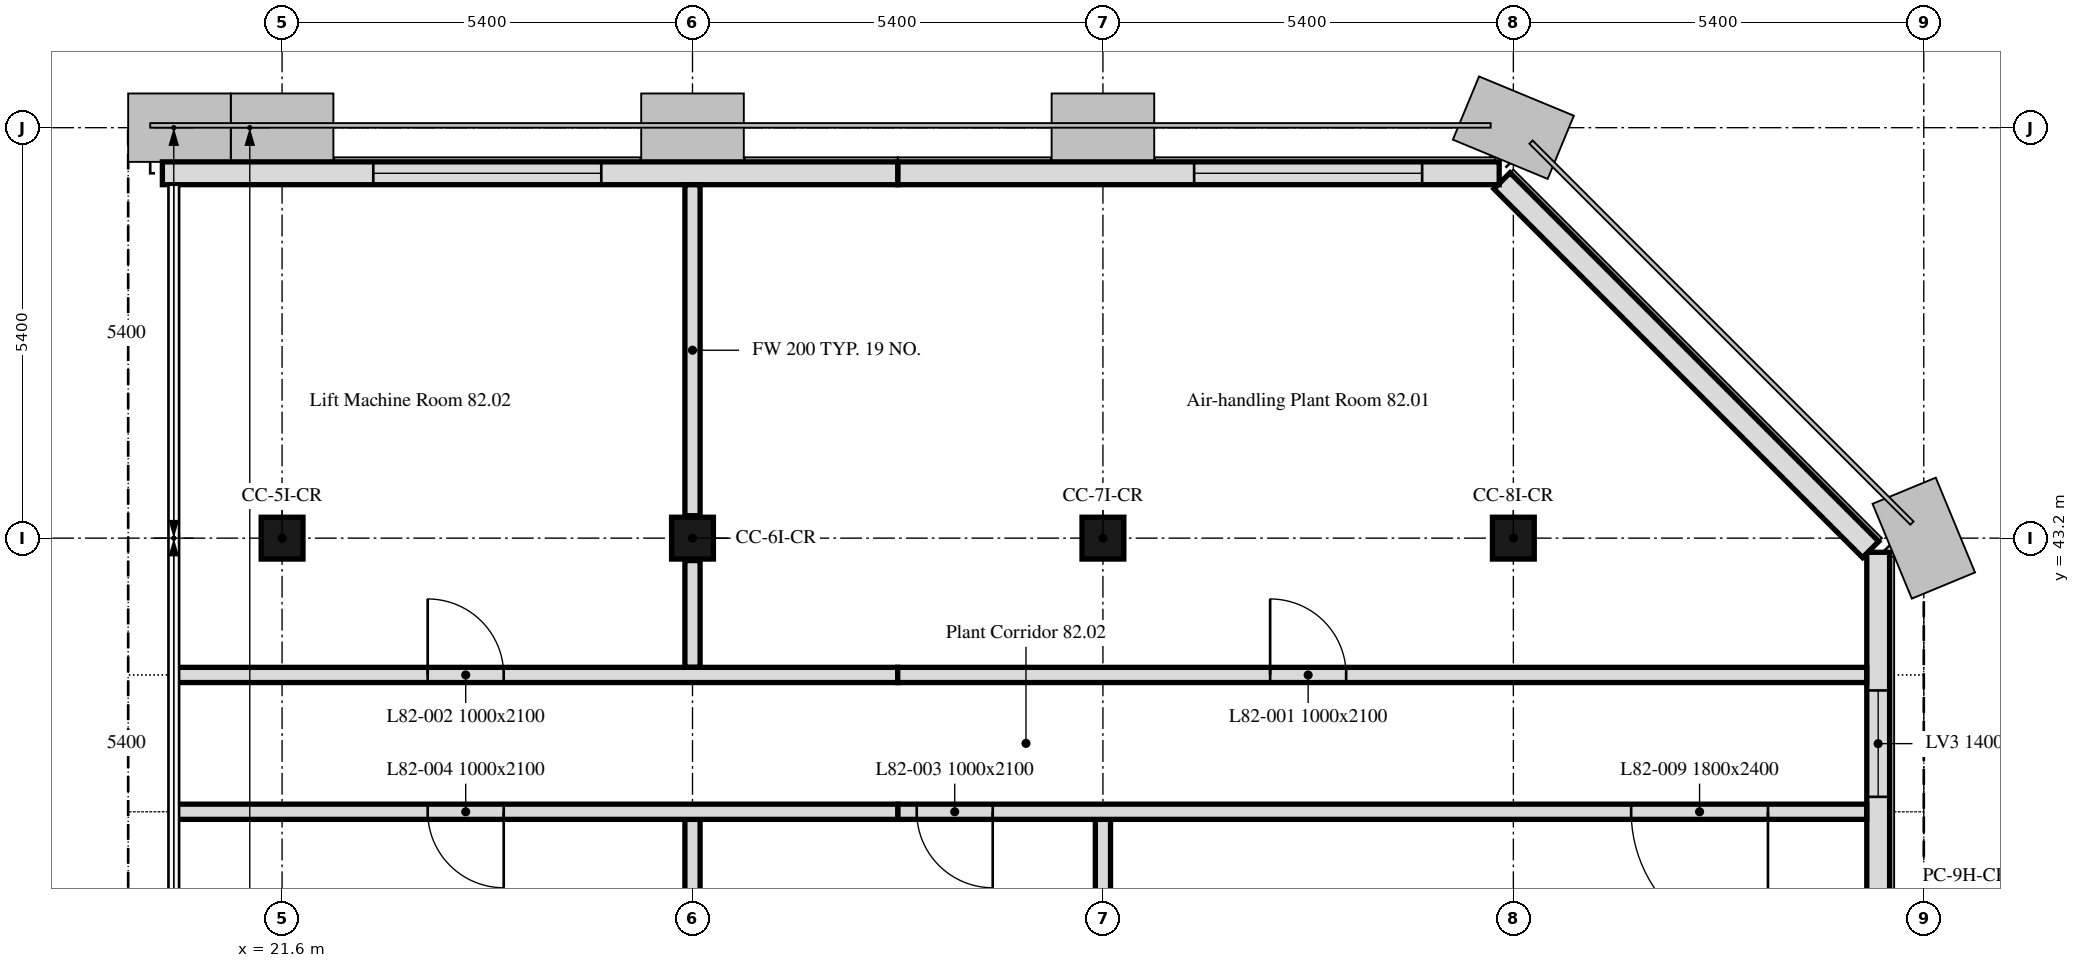
"""IFC4 building model, lengths in metres.
Left out: names, types, materials, properties, quantities, classifications, styles, units other than length and angle.
Written with IfcOpenShell. Run it as: python <this file> out.ifc"""

import sys

from ifc_helpers import new_model, si_unit, direction, frame, frame_2d, origin, origin_2d, place, context, subcontext, project, spatial, polyline, rectangle, outline, extrude, element, fill, save


model = new_model("IFC4")
c1 = context("Model", 3, precision=1e-05, world=origin(), true_north=direction((0.0, 1.0)))
c2 = subcontext(c1, "Body", "Model", "MODEL_VIEW")
j1 = project(units=[si_unit("LENGTHUNIT", "METRE"), si_unit("PLANEANGLEUNIT", "RADIAN")], contexts=[c1])
p1 = place(None, origin())
s1 = spatial("IfcSite", under=j1, at=p1, CompositionType="ELEMENT")
p2 = place(p1, origin())
s2 = spatial("IfcBuilding", under=s1, at=p2, CompositionType="ELEMENT")
p3 = place(p2, frame((0.0, 0.0, 330.7)))
s3 = spatial("IfcBuildingStorey", under=s2, at=p3, CompositionType="ELEMENT", Elevation=330.7)
p4 = place(p3, frame((21.6, 43.2, 0.0), z_axis=(0.0, 0.0, 1.0), x_axis=(1.0, 0.0, 0.0)))
e1 = element("IfcColumn", 1, at=p4, inside=s3, PredefinedType="COLUMN", context=c2, shape_type="SweptSolid", body=[
    extrude(rectangle(XDim=0.55, YDim=0.55, at=origin_2d()), origin(), (0.0, 0.0, 1.0), 3.6),
])
for number, where, z_axis, x_axis in (
    (2, (27.0, 43.2, 0.0), (0.0, 0.0, 1.0), (1.0, 0.0, 0.0)),
    (3, (32.4, 43.2, 0.0), (0.0, 0.0, 1.0), (1.0, 0.0, 0.0)),
    (4, (37.8, 43.2, 0.0), (0.0, 0.0, 1.0), (1.0, 0.0, 0.0)),
):
    element("IfcColumn", number, at=place(p3, frame(where, z_axis=z_axis, x_axis=x_axis)), inside=s3, PredefinedType="COLUMN", context=c2, shape_type="SweptSolid", body=[
        extrude(rectangle(XDim=0.55, YDim=0.55, at=origin_2d()), origin(), (0.0, 0.0, 1.0), 4.2),
    ])
p5 = place(p3, frame((42.6, 32.4, 0.0), z_axis=(0.0, 0.0, 1.0), x_axis=(0.0, 1.0, 0.0)))
e5 = element("IfcWall", 5, at=p5, inside=s3, PredefinedType="SOLIDWALL", context=c2, shape_type="SweptSolid", body=[
    extrude(outline(polyline([(0.0, 0.0), (10.614, 0.0), (10.614, 4.2), (10.024, 4.2), (9.434, 4.2), (8.845, 4.2), (8.255, 4.2), (7.665, 4.2), (7.076, 4.2), (6.486, 4.2), (5.896, 4.2), (5.307, 4.2), (4.717, 4.2), (4.127, 4.2), (3.538, 4.2), (2.948, 4.2), (2.359, 4.2), (1.769, 4.2), (1.179, 4.2), (0.59, 4.2), (0.0, 4.2), (0.0, 0.0)])), frame((0.0, 0.15, 0.0), z_axis=(0.0, -1.0, 0.0), x_axis=(1.0, 0.0, 0.0)), (0.0, 0.0, 1.0), 0.3),
])
p6 = place(p5, frame((1.2, 0.0, 0.6)))
e6 = element("IfcOpeningElement", 6, at=p6, cuts=e5, PredefinedType="OPENING", context=c2, shape_type="SweptSolid", body=[
    extrude(rectangle(XDim=3.0, YDim=1.8, at=frame_2d((1.5, 0.9))), frame((0.0, 0.16, 0.0), z_axis=(0.0, -1.0, 0.0), x_axis=(1.0, 0.0, 0.0)), (0.0, 0.0, 1.0), 0.32),
])
p7 = place(p5, frame((7.396, 0.0, 0.6)))
e7 = element("IfcOpeningElement", 7, at=p7, cuts=e5, PredefinedType="OPENING", context=c2, shape_type="SweptSolid", body=[
    extrude(rectangle(XDim=1.4, YDim=1.8, at=frame_2d((0.7, 0.9))), frame((0.0, 0.16, 0.0), z_axis=(0.0, -1.0, 0.0), x_axis=(1.0, 0.0, 0.0)), (0.0, 0.0, 1.0), 0.32),
])
p8 = place(p3, frame((42.501, 43.051, 0.0), z_axis=(0.0, 0.0, 1.0), x_axis=(-0.707106781187, 0.707106781187, 0.0)))
e8 = element("IfcWall", 8, at=p8, inside=s3, PredefinedType="SOLIDWALL", context=c2, shape_type="SweptSolid", body=[
    extrude(outline(polyline([(0.0, 0.0), (6.86, 0.0), (6.86, 4.2), (6.288, 4.2), (5.716, 4.2), (5.145, 4.2), (4.573, 4.2), (4.001, 4.2), (3.43, 4.2), (2.858, 4.2), (2.287, 4.2), (1.715, 4.2), (1.143, 4.2), (0.572, 4.2), (0.0, 4.2), (0.0, 0.0)])), frame((0.0, 0.15, 0.0), z_axis=(0.0, -1.0, 0.0), x_axis=(1.0, 0.0, 0.0)), (0.0, 0.0, 1.0), 0.3),
])
p9 = place(p3, frame((37.614, 48.0, 0.0), z_axis=(0.0, 0.0, 1.0), x_axis=(-1.0, 0.0, 0.0)))
e9 = element("IfcWall", 9, at=p9, inside=s3, PredefinedType="SOLIDWALL", context=c2, shape_type="SweptSolid", body=[
    extrude(outline(polyline([(0.0, 0.0), (7.914, 0.0), (7.914, 4.2), (7.348, 4.2), (6.783, 4.2), (6.218, 4.2), (5.653, 4.2), (5.087, 4.2), (4.522, 4.2), (3.957, 4.2), (3.392, 4.2), (2.826, 4.2), (2.261, 4.2), (1.696, 4.2), (1.131, 4.2), (0.565, 4.2), (0.0, 4.2), (0.0, 0.0)])), frame((0.0, 0.15, 0.0), z_axis=(0.0, -1.0, 0.0), x_axis=(1.0, 0.0, 0.0)), (0.0, 0.0, 1.0), 0.3),
])
p10 = place(p9, frame((1.014, 0.0, 0.6)))
e10 = element("IfcOpeningElement", 10, at=p10, cuts=e9, PredefinedType="OPENING", context=c2, shape_type="SweptSolid", body=[
    extrude(rectangle(XDim=3.0, YDim=1.8, at=frame_2d((1.5, 0.9))), frame((0.0, 0.16, 0.0), z_axis=(0.0, -1.0, 0.0), x_axis=(1.0, 0.0, 0.0)), (0.0, 0.0, 1.0), 0.32),
])
p11 = place(p3, frame((29.7, 48.0, 0.0), z_axis=(0.0, 0.0, 1.0), x_axis=(-1.0, 0.0, 0.0)))
e11 = element("IfcWall", 11, at=p11, inside=s3, PredefinedType="SOLIDWALL", context=c2, shape_type="SweptSolid", body=[
    extrude(outline(polyline([(0.0, 0.0), (9.675, 0.0), (9.675, 2.9), (9.106, 3.153), (8.537, 3.406), (7.968, 3.659), (7.398, 3.912), (6.829, 4.165), (6.26, 4.418), (5.691, 4.671), (5.122, 4.924), (4.553, 5.177), (3.984, 5.429), (3.415, 5.682), (2.846, 5.935), (2.276, 6.188), (1.707, 6.441), (1.138, 6.694), (0.569, 6.947), (0.0, 4.2), (0.0, 0.0)])), frame((0.0, 0.15, 0.0), z_axis=(0.0, -1.0, 0.0), x_axis=(1.0, 0.0, 0.0)), (0.0, 0.0, 1.0), 0.3),
])
p12 = place(p11, frame((3.9, 0.0, 0.6)))
e12 = element("IfcOpeningElement", 12, at=p12, cuts=e11, PredefinedType="OPENING", context=c2, shape_type="SweptSolid", body=[
    extrude(rectangle(XDim=3.0, YDim=1.8, at=frame_2d((1.5, 0.9))), frame((0.0, 0.16, 0.0), z_axis=(0.0, -1.0, 0.0), x_axis=(1.0, 0.0, 0.0)), (0.0, 0.0, 1.0), 0.32),
])
p13 = place(p3, frame((27.0, 47.849, 0.0), z_axis=(0.0, 0.0, 1.0), x_axis=(0.0, -1.0, 0.0)))
e13 = element("IfcWall", 13, at=p13, inside=s3, PredefinedType="PARTITIONING", context=c2, shape_type="SweptSolid", body=[
    extrude(rectangle(XDim=4.354, YDim=0.2, at=frame_2d((2.177, 0.0))), origin(), (0.0, 0.0, 1.0), 6.0),
])
p14 = place(p3, frame((27.0, 42.905, 0.0), z_axis=(0.0, 0.0, 1.0), x_axis=(0.0, -1.0, 0.0)))
e14 = element("IfcWall", 14, at=p14, inside=s3, PredefinedType="PARTITIONING", context=c2, shape_type="SweptSolid", body=[
    extrude(rectangle(XDim=1.405, YDim=0.2, at=frame_2d((0.703, 0.0))), origin(), (0.0, 0.0, 1.0), 6.0),
])
p15 = place(p3, frame((20.175, 41.4, 0.0), z_axis=(0.0, 0.0, 1.0), x_axis=(1.0, 0.0, 0.0)))
e15 = element("IfcWall", 15, at=p15, inside=s3, PredefinedType="PARTITIONING", context=c2, shape_type="SweptSolid", body=[
    extrude(outline(polyline([(0.0, 0.0), (9.525, 0.0), (9.525, 4.2), (0.0, 2.967), (0.0, 0.0)])), frame((0.0, 0.1, 0.0), z_axis=(0.0, -1.0, 0.0), x_axis=(1.0, 0.0, 0.0)), (0.0, 0.0, 1.0), 0.2),
])
p16 = place(p15, frame((3.341, 0.0, 0.0)))
e16 = element("IfcOpeningElement", 16, at=p16, cuts=e15, PredefinedType="OPENING", context=c2, shape_type="SweptSolid", body=[
    extrude(rectangle(XDim=1.0, YDim=2.1, at=frame_2d((0.5, 1.05))), frame((0.0, 0.1, 0.0), z_axis=(0.0, -1.0, 0.0), x_axis=(1.0, 0.0, 0.0)), (0.0, 0.0, 1.0), 0.2),
])
p17 = place(p3, frame((29.7, 41.4, 0.0), z_axis=(0.0, 0.0, 1.0), x_axis=(1.0, 0.0, 0.0)))
e17 = element("IfcWall", 17, at=p17, inside=s3, PredefinedType="PARTITIONING", context=c2, shape_type="SweptSolid", body=[
    extrude(rectangle(XDim=12.749, YDim=0.2, at=frame_2d((6.375, 0.0))), origin(), (0.0, 0.0, 1.0), 3.45),
])
p18 = place(p17, frame((4.9, 0.0, 0.0)))
e18 = element("IfcOpeningElement", 18, at=p18, cuts=e17, PredefinedType="OPENING", context=c2, shape_type="SweptSolid", body=[
    extrude(rectangle(XDim=1.0, YDim=2.1, at=frame_2d((0.5, 1.05))), frame((0.0, 0.1, 0.0), z_axis=(0.0, -1.0, 0.0), x_axis=(1.0, 0.0, 0.0)), (0.0, 0.0, 1.0), 0.2),
])
p19 = place(p3, frame((32.4, 38.095, 0.0), z_axis=(0.0, 0.0, 1.0), x_axis=(0.0, 1.0, 0.0)))
e19 = element("IfcWall", 19, at=p19, inside=s3, PredefinedType="PARTITIONING", context=c2, shape_type="SweptSolid", body=[
    extrude(rectangle(XDim=1.405, YDim=0.2, at=frame_2d((0.703, 0.0))), origin(), (0.0, 0.0, 1.0), 3.45),
])
p20 = place(p3, frame((27.0, 39.5, 0.0), z_axis=(0.0, 0.0, 1.0), x_axis=(0.0, -1.0, 0.0)))
e20 = element("IfcWall", 20, at=p20, inside=s3, PredefinedType="PARTITIONING", context=c2, shape_type="SweptSolid", body=[
    extrude(rectangle(XDim=1.405, YDim=0.2, at=frame_2d((0.703, 0.0))), origin(), (0.0, 0.0, 1.0), 6.0),
])
p21 = place(p3, frame((42.449, 39.6, 0.0), z_axis=(0.0, 0.0, 1.0), x_axis=(-1.0, 0.0, 0.0)))
e21 = element("IfcWall", 21, at=p21, inside=s3, PredefinedType="PARTITIONING", context=c2, shape_type="SweptSolid", body=[
    extrude(rectangle(XDim=12.749, YDim=0.2, at=frame_2d((6.375, 0.0))), origin(), (0.0, 0.0, 1.0), 3.45),
])
p22 = place(p21, frame((11.499, 0.0, 0.0)))
e22 = element("IfcOpeningElement", 22, at=p22, cuts=e21, PredefinedType="OPENING", context=c2, shape_type="SweptSolid", body=[
    extrude(rectangle(XDim=1.0, YDim=2.1, at=frame_2d((0.5, 1.05))), frame((0.0, 0.1, 0.0), z_axis=(0.0, -1.0, 0.0), x_axis=(1.0, 0.0, 0.0)), (0.0, 0.0, 1.0), 0.2),
])
p23 = place(p21, frame((1.299, 0.0, 0.0)))
e23 = element("IfcOpeningElement", 23, at=p23, cuts=e21, PredefinedType="OPENING", context=c2, shape_type="SweptSolid", body=[
    extrude(rectangle(XDim=1.8, YDim=2.4, at=frame_2d((0.9, 1.2))), frame((0.0, 0.1, 0.0), z_axis=(0.0, -1.0, 0.0), x_axis=(1.0, 0.0, 0.0)), (0.0, 0.0, 1.0), 0.2),
])
p24 = place(p3, frame((29.7, 39.6, 0.0), z_axis=(0.0, 0.0, 1.0), x_axis=(-1.0, 0.0, 0.0)))
e24 = element("IfcWall", 24, at=p24, inside=s3, PredefinedType="PARTITIONING", context=c2, shape_type="SweptSolid", body=[
    extrude(outline(polyline([(0.0, 0.0), (9.525, 0.0), (9.525, 2.967), (0.0, 4.2), (0.0, 0.0)])), frame((0.0, 0.1, 0.0), z_axis=(0.0, -1.0, 0.0), x_axis=(1.0, 0.0, 0.0)), (0.0, 0.0, 1.0), 0.2),
])
p25 = place(p24, frame((5.184, 0.0, 0.0)))
e25 = element("IfcOpeningElement", 25, at=p25, cuts=e24, PredefinedType="OPENING", context=c2, shape_type="SweptSolid", body=[
    extrude(rectangle(XDim=1.0, YDim=2.1, at=frame_2d((0.5, 1.05))), frame((0.0, 0.1, 0.0), z_axis=(0.0, -1.0, 0.0), x_axis=(1.0, 0.0, 0.0)), (0.0, 0.0, 1.0), 0.2),
])
p26 = place(p7, origin())
e26 = element("IfcWindow", 26, at=p26, inside=s3, PartitioningType="SINGLE_PANEL", PredefinedType="WINDOW", context=c2, shape_type="SweptSolid", body=[
    extrude(rectangle(XDim=1.4, YDim=1.8, at=frame_2d((0.7, 0.9))), frame((0.0, 0.03, 0.0), z_axis=(0.0, -1.0, 0.0), x_axis=(1.0, 0.0, 0.0)), (0.0, 0.0, 1.0), 0.06),
])
fill(e7, e26)
p27 = place(p10, origin())
e27 = element("IfcWindow", 27, at=p27, inside=s3, PartitioningType="SINGLE_PANEL", PredefinedType="WINDOW", context=c2, shape_type="SweptSolid", body=[
    extrude(rectangle(XDim=3.0, YDim=1.8, at=frame_2d((1.5, 0.9))), frame((0.0, 0.03, 0.0), z_axis=(0.0, -1.0, 0.0), x_axis=(1.0, 0.0, 0.0)), (0.0, 0.0, 1.0), 0.06),
])
fill(e10, e27)
p28 = place(p12, origin())
e28 = element("IfcWindow", 28, at=p28, inside=s3, PartitioningType="SINGLE_PANEL", PredefinedType="WINDOW", context=c2, shape_type="SweptSolid", body=[
    extrude(rectangle(XDim=3.0, YDim=1.8, at=frame_2d((1.5, 0.9))), frame((0.0, 0.03, 0.0), z_axis=(0.0, -1.0, 0.0), x_axis=(1.0, 0.0, 0.0)), (0.0, 0.0, 1.0), 0.06),
])
fill(e12, e28)
p29 = place(p18, origin())
e29 = element("IfcDoor", 29, at=p29, inside=s3, OperationType="SINGLE_SWING_RIGHT", PredefinedType="DOOR", context=c2, shape_type="SweptSolid", body=[
    extrude(rectangle(XDim=1.0, YDim=2.1, at=frame_2d((0.5, 1.05))), frame((0.0, 0.025, 0.0), z_axis=(0.0, -1.0, 0.0), x_axis=(1.0, 0.0, 0.0)), (0.0, 0.0, 1.0), 0.05),
])
fill(e18, e29)
p30 = place(p16, origin())
e30 = element("IfcDoor", 30, at=p30, inside=s3, OperationType="SINGLE_SWING_LEFT", PredefinedType="DOOR", context=c2, shape_type="SweptSolid", body=[
    extrude(rectangle(XDim=1.0, YDim=2.1, at=frame_2d((0.5, 1.05))), frame((0.0, 0.025, 0.0), z_axis=(0.0, -1.0, 0.0), x_axis=(1.0, 0.0, 0.0)), (0.0, 0.0, 1.0), 0.05),
])
fill(e16, e30)
p31 = place(p22, origin())
e31 = element("IfcDoor", 31, at=p31, inside=s3, OperationType="SINGLE_SWING_RIGHT", PredefinedType="DOOR", context=c2, shape_type="SweptSolid", body=[
    extrude(rectangle(XDim=1.0, YDim=2.1, at=frame_2d((0.5, 1.05))), frame((0.0, 0.025, 0.0), z_axis=(0.0, -1.0, 0.0), x_axis=(1.0, 0.0, 0.0)), (0.0, 0.0, 1.0), 0.05),
])
fill(e22, e31)
p32 = place(p25, origin())
e32 = element("IfcDoor", 32, at=p32, inside=s3, OperationType="SINGLE_SWING_LEFT", PredefinedType="DOOR", context=c2, shape_type="SweptSolid", body=[
    extrude(rectangle(XDim=1.0, YDim=2.1, at=frame_2d((0.5, 1.05))), frame((0.0, 0.025, 0.0), z_axis=(0.0, -1.0, 0.0), x_axis=(1.0, 0.0, 0.0)), (0.0, 0.0, 1.0), 0.05),
])
fill(e25, e32)
p33 = place(p23, origin())
e33 = element("IfcDoor", 33, at=p33, inside=s3, OperationType="DOUBLE_DOOR_SINGLE_SWING", PredefinedType="DOOR", context=c2, shape_type="SweptSolid", body=[
    extrude(rectangle(XDim=1.8, YDim=2.4, at=frame_2d((0.9, 1.2))), frame((0.0, 0.025, 0.0), z_axis=(0.0, -1.0, 0.0), x_axis=(1.0, 0.0, 0.0)), (0.0, 0.0, 1.0), 0.05),
])
fill(e23, e33)
save(model, sys.argv[1])
